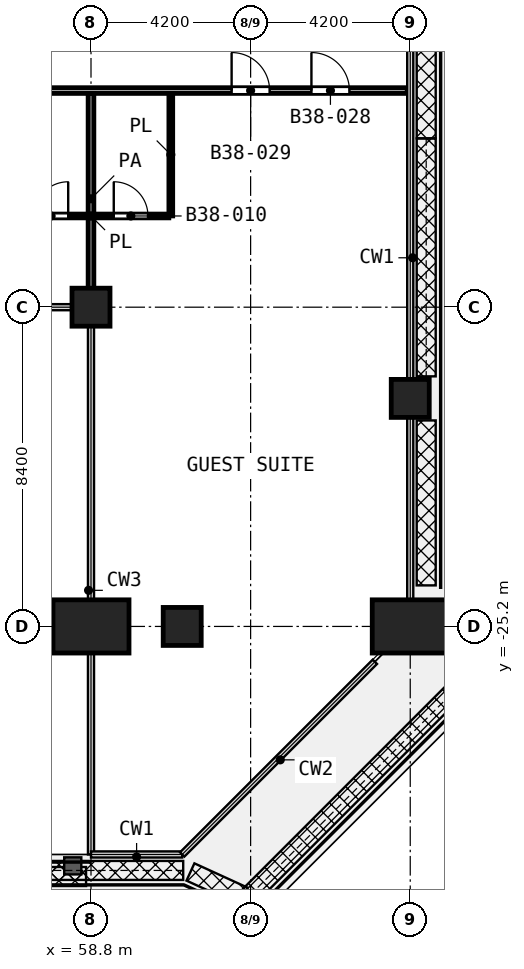
"""IFC4 building model, lengths in metres.
Left out: names, types, materials, properties, quantities, classifications, styles, units other than length and angle.
Written with IfcOpenShell. Run it as: python <this file> out.ifc"""

import sys

from ifc_helpers import new_model, si_unit, direction, frame, frame_2d, origin, origin_2d, place, context, subcontext, project, spatial, rectangle, extrude, element, fill, save


model = new_model("IFC4")
c1 = context("Model", 3, precision=1e-05, world=origin(), true_north=direction((0.0, 1.0)))
c2 = subcontext(c1, "Body", "Model", "MODEL_VIEW")
j1 = project(units=[si_unit("LENGTHUNIT", "METRE"), si_unit("PLANEANGLEUNIT", "RADIAN")], contexts=[c1])
p1 = place(None, origin())
s1 = spatial("IfcSite", under=j1, at=p1, CompositionType="ELEMENT")
p2 = place(p1, origin())
s2 = spatial("IfcBuilding", under=s1, at=p2, CompositionType="ELEMENT")
p3 = place(p2, frame((0.0, 0.0, 166.8)))
s3 = spatial("IfcBuildingStorey", under=s2, at=p3, CompositionType="ELEMENT", Elevation=166.8)
for number, where, z_axis, x_axis in (
    (1, (58.8, -16.8, 0.0), (0.0, 0.0, 1.0), (1.0, 0.0, 0.0)),
    (2, (67.2, -19.2, 0.0), (0.0, 0.0, 1.0), (1.0, 0.0, 0.0)),
    (3, (61.2, -25.2, 0.0), (0.0, 0.0, 1.0), (1.0, 0.0, 0.0)),
):
    element("IfcColumn", number, at=place(p3, frame(where, z_axis=z_axis, x_axis=x_axis)), inside=s3, PredefinedType="COLUMN", context=c2, shape_type="SweptSolid", body=[
        extrude(rectangle(XDim=1.0, YDim=1.0, at=origin_2d()), origin(), (0.0, 0.0, 1.0), 4.2),
    ])
for number, where, z_axis, x_axis in (
    (4, (67.2, -25.2, 0.0), (0.0, 0.0, 1.0), (-1.0, 0.0, 0.0)),
    (5, (58.8, -25.2, 0.0), (0.0, 0.0, 1.0), (-1.0, 0.0, 0.0)),
):
    element("IfcColumn", number, at=place(p3, frame(where, z_axis=z_axis, x_axis=x_axis)), inside=s3, PredefinedType="COLUMN", context=c2, shape_type="SweptSolid", body=[
        extrude(rectangle(XDim=2.0, YDim=1.4, at=origin_2d()), origin(), (0.0, 0.0, 1.0), 4.2),
    ])
p4 = place(p3, frame((56.75, -14.4, 0.0), z_axis=(0.0, 0.0, 1.0), x_axis=(1.0, 0.0, 0.0)))
e6 = element("IfcWall", 6, at=p4, inside=s3, PredefinedType="PARTITIONING", context=c2, shape_type="SweptSolid", body=[
    extrude(rectangle(XDim=4.098, YDim=0.1, at=frame_2d((2.049, 0.0))), origin(), (0.0, 0.0, 1.0), 3.6),
])
p5 = place(p4, frame((0.55, 0.0, 0.0)))
e7 = element("IfcOpeningElement", 7, at=p5, cuts=e6, PredefinedType="OPENING", context=c2, shape_type="SweptSolid", body=[
    extrude(rectangle(XDim=0.9, YDim=2.1, at=frame_2d((0.45, 1.05))), frame((0.0, 0.06, 0.0), z_axis=(0.0, -1.0, 0.0), x_axis=(1.0, 0.0, 0.0)), (0.0, 0.0, 1.0), 0.12),
])
p6 = place(p4, frame((2.649, 0.0, 0.0)))
e8 = element("IfcOpeningElement", 8, at=p6, cuts=e6, PredefinedType="OPENING", context=c2, shape_type="SweptSolid", body=[
    extrude(rectangle(XDim=0.9, YDim=2.1, at=frame_2d((0.45, 1.05))), frame((0.0, 0.06, 0.0), z_axis=(0.0, -1.0, 0.0), x_axis=(1.0, 0.0, 0.0)), (0.0, 0.0, 1.0), 0.12),
])
p7 = place(p3, frame((60.9, -14.399, 0.0), z_axis=(0.0, 0.0, 1.0), x_axis=(0.0, 1.0, 0.0)))
e9 = element("IfcWall", 9, at=p7, inside=s3, PredefinedType="PARTITIONING", context=c2, shape_type="SweptSolid", body=[
    extrude(rectangle(XDim=3.224, YDim=0.1, at=frame_2d((1.612, 0.0))), origin(), (0.0, 0.0, 1.0), 3.6),
])
p8 = place(p3, frame((29.475, -11.1, 0.0), z_axis=(0.0, 0.0, 1.0), x_axis=(1.0, 0.0, 0.0)))
e10 = element("IfcWall", 10, at=p8, inside=s3, PredefinedType="PARTITIONING", context=c2, shape_type="SweptSolid", body=[
    extrude(rectangle(XDim=37.645, YDim=0.15, at=frame_2d((18.823, 0.0))), origin(), (0.0, 0.0, 1.0), 3.6),
])
p9 = place(p8, frame((3.675, 0.0, 0.0)))
e11 = element("IfcOpeningElement", 11, at=p9, cuts=e10, PredefinedType="OPENING", context=c2, shape_type="SweptSolid", body=[
    extrude(rectangle(XDim=1.5, YDim=2.1, at=frame_2d((0.75, 1.05))), frame((0.0, 0.085, 0.0), z_axis=(0.0, -1.0, 0.0), x_axis=(1.0, 0.0, 0.0)), (0.0, 0.0, 1.0), 0.17),
])
p10 = place(p8, frame((9.225, 0.0, 0.0)))
e12 = element("IfcOpeningElement", 12, at=p10, cuts=e10, PredefinedType="OPENING", context=c2, shape_type="SweptSolid", body=[
    extrude(rectangle(XDim=1.0, YDim=2.1, at=frame_2d((0.5, 1.05))), frame((0.0, 0.085, 0.0), z_axis=(0.0, -1.0, 0.0), x_axis=(1.0, 0.0, 0.0)), (0.0, 0.0, 1.0), 0.17),
])
p11 = place(p8, frame((15.225, 0.0, 0.0)))
e13 = element("IfcOpeningElement", 13, at=p11, cuts=e10, PredefinedType="OPENING", context=c2, shape_type="SweptSolid", body=[
    extrude(rectangle(XDim=1.0, YDim=2.1, at=frame_2d((0.5, 1.05))), frame((0.0, 0.085, 0.0), z_axis=(0.0, -1.0, 0.0), x_axis=(1.0, 0.0, 0.0)), (0.0, 0.0, 1.0), 0.17),
])
p12 = place(p8, frame((23.2, 0.0, 0.0)))
e14 = element("IfcOpeningElement", 14, at=p12, cuts=e10, PredefinedType="OPENING", context=c2, shape_type="SweptSolid", body=[
    extrude(rectangle(XDim=1.0, YDim=2.1, at=frame_2d((0.5, 1.05))), frame((0.0, 0.085, 0.0), z_axis=(0.0, -1.0, 0.0), x_axis=(1.0, 0.0, 0.0)), (0.0, 0.0, 1.0), 0.17),
])
p13 = place(p8, frame((21.475, 0.0, 0.0)))
e15 = element("IfcOpeningElement", 15, at=p13, cuts=e10, PredefinedType="OPENING", context=c2, shape_type="SweptSolid", body=[
    extrude(rectangle(XDim=1.0, YDim=2.1, at=frame_2d((0.5, 1.05))), frame((0.0, 0.085, 0.0), z_axis=(0.0, -1.0, 0.0), x_axis=(1.0, 0.0, 0.0)), (0.0, 0.0, 1.0), 0.17),
])
p14 = place(p8, frame((19.75, 0.0, 0.0)))
e16 = element("IfcOpeningElement", 16, at=p14, cuts=e10, PredefinedType="OPENING", context=c2, shape_type="SweptSolid", body=[
    extrude(rectangle(XDim=1.0, YDim=2.1, at=frame_2d((0.5, 1.05))), frame((0.0, 0.085, 0.0), z_axis=(0.0, -1.0, 0.0), x_axis=(1.0, 0.0, 0.0)), (0.0, 0.0, 1.0), 0.17),
])
p15 = place(p8, frame((26.025, 0.0, 0.0)))
e17 = element("IfcOpeningElement", 17, at=p15, cuts=e10, PredefinedType="OPENING", context=c2, shape_type="SweptSolid", body=[
    extrude(rectangle(XDim=1.0, YDim=2.1, at=frame_2d((0.5, 1.05))), frame((0.0, 0.085, 0.0), z_axis=(0.0, -1.0, 0.0), x_axis=(1.0, 0.0, 0.0)), (0.0, 0.0, 1.0), 0.17),
])
p16 = place(p8, frame((35.125, 0.0, 0.0)))
e18 = element("IfcOpeningElement", 18, at=p16, cuts=e10, PredefinedType="OPENING", context=c2, shape_type="SweptSolid", body=[
    extrude(rectangle(XDim=1.0, YDim=2.1, at=frame_2d((0.5, 1.05))), frame((0.0, 0.085, 0.0), z_axis=(0.0, -1.0, 0.0), x_axis=(1.0, 0.0, 0.0)), (0.0, 0.0, 1.0), 0.17),
])
p17 = place(p8, frame((33.025, 0.0, 0.0)))
e19 = element("IfcOpeningElement", 19, at=p17, cuts=e10, PredefinedType="OPENING", context=c2, shape_type="SweptSolid", body=[
    extrude(rectangle(XDim=1.0, YDim=2.1, at=frame_2d((0.5, 1.05))), frame((0.0, 0.085, 0.0), z_axis=(0.0, -1.0, 0.0), x_axis=(1.0, 0.0, 0.0)), (0.0, 0.0, 1.0), 0.17),
])
p18 = place(p3, frame((58.8, -16.72, 0.0), z_axis=(0.0, 0.0, 1.0), x_axis=(0.0, 1.0, 0.0)))
e20 = element("IfcWall", 20, at=p18, inside=s3, PredefinedType="PARTITIONING", context=c2, shape_type="SweptSolid", body=[
    extrude(rectangle(XDim=5.545, YDim=0.15, at=frame_2d((2.772, 0.0))), origin(), (0.0, 0.0, 1.0), 3.6),
])
p19 = place(p5, origin())
e21 = element("IfcDoor", 21, at=p19, inside=s3, OperationType="SINGLE_SWING_RIGHT", PredefinedType="DOOR", context=c2, shape_type="SweptSolid", body=[
    extrude(rectangle(XDim=0.9, YDim=2.1, at=frame_2d((0.45, 1.05))), frame((0.0, 0.025, 0.0), z_axis=(0.0, -1.0, 0.0), x_axis=(1.0, 0.0, 0.0)), (0.0, 0.0, 1.0), 0.05),
])
fill(e7, e21)
p20 = place(p16, origin())
e22 = element("IfcDoor", 22, at=p20, inside=s3, OperationType="SINGLE_SWING_LEFT", PredefinedType="DOOR", context=c2, shape_type="SweptSolid", body=[
    extrude(rectangle(XDim=1.0, YDim=2.1, at=frame_2d((0.5, 1.05))), frame((0.0, 0.025, 0.0), z_axis=(0.0, -1.0, 0.0), x_axis=(1.0, 0.0, 0.0)), (0.0, 0.0, 1.0), 0.05),
])
fill(e18, e22)
p21 = place(p17, origin())
e23 = element("IfcDoor", 23, at=p21, inside=s3, OperationType="SINGLE_SWING_LEFT", PredefinedType="DOOR", context=c2, shape_type="SweptSolid", body=[
    extrude(rectangle(XDim=1.0, YDim=2.1, at=frame_2d((0.5, 1.05))), frame((0.0, 0.025, 0.0), z_axis=(0.0, -1.0, 0.0), x_axis=(1.0, 0.0, 0.0)), (0.0, 0.0, 1.0), 0.05),
])
fill(e19, e23)
p22 = place(p6, origin())
e24 = element("IfcDoor", 24, at=p22, inside=s3, OperationType="SINGLE_SWING_LEFT", PredefinedType="DOOR", context=c2, shape_type="SweptSolid", body=[
    extrude(rectangle(XDim=0.9, YDim=2.1, at=frame_2d((0.45, 1.05))), frame((0.0, 0.025, 0.0), z_axis=(0.0, -1.0, 0.0), x_axis=(1.0, 0.0, 0.0)), (0.0, 0.0, 1.0), 0.05),
])
fill(e8, e24)
save(model, sys.argv[1])
